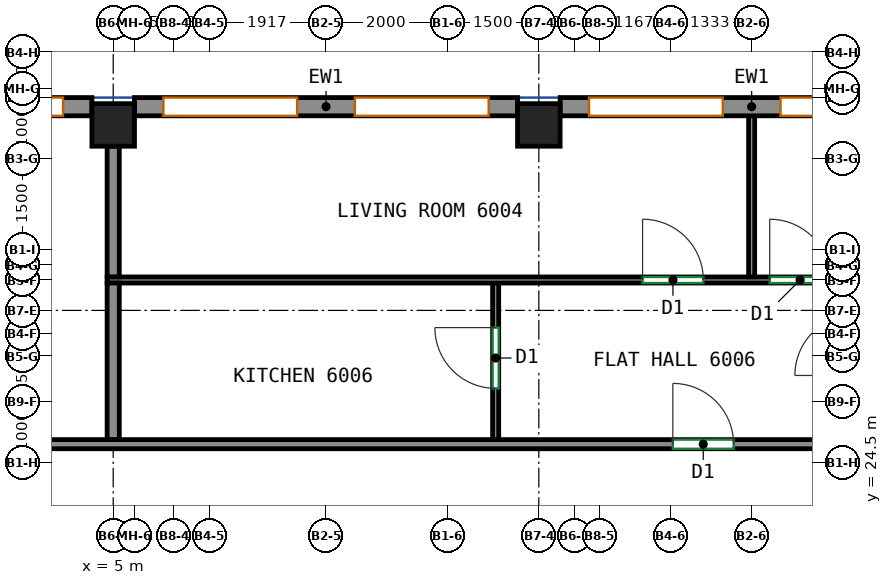
"""IFC4 building model, lengths in metres.
Left out: names, types, materials, properties, quantities, classifications, styles, units other than length and angle.
Written with IfcOpenShell. Run it as: python <this file> out.ifc"""

import sys

from ifc_helpers import new_model, si_unit, direction, frame, frame_2d, origin, origin_2d, place, context, subcontext, project, spatial, rectangle, extrude, source, transform, mapped, element, fill, save


model = new_model("IFC4")
c1 = context("Model", 3, precision=1e-05, world=origin(), true_north=direction((0.0, 1.0)))
c2 = subcontext(c1, "Body", "Model", "MODEL_VIEW")
j1 = project(units=[si_unit("LENGTHUNIT", "METRE"), si_unit("PLANEANGLEUNIT", "RADIAN")], contexts=[c1])
p1 = place(None, origin())
s1 = spatial("IfcSite", under=j1, at=p1, CompositionType="ELEMENT")
p2 = place(p1, origin())
s2 = spatial("IfcBuilding", under=s1, at=p2, CompositionType="ELEMENT")
p3 = place(p2, frame((0.0, 0.0, 249.2)))
s3 = spatial("IfcBuildingStorey", under=s2, at=p3, CompositionType="ELEMENT", Elevation=249.2)
m1 = source(origin(), c2, "Body", "SweptSolid", [
    extrude(rectangle(XDim=0.7, YDim=0.7, at=origin_2d()), origin(), (0.0, 0.0, 1.0), 3.12),
])
for number, where, z_axis, x_axis in (
    (1, (5.0, 30.05, 0.0), (0.0, 0.0, 1.0), (1.0, 0.0, 0.0)),
    (2, (12.0, 30.05, 0.0), (0.0, 0.0, 1.0), (1.0, 0.0, 0.0)),
):
    element("IfcColumn", number, at=place(p3, frame(where, z_axis=z_axis, x_axis=x_axis)), inside=s3, PredefinedType="COLUMN", context=c2, shape_type="MappedRepresentation", body=[
        mapped(m1, transform((0.0, 0.0, 0.0))),
    ])
m2 = source(origin(), c2, "Body", "SweptSolid", [
    extrude(rectangle(XDim=6.3, YDim=0.3, at=frame_2d((3.15, 0.0))), origin(), (0.0, 0.0, 1.0), 3.12),
])
p4 = place(p3, frame((18.65, 30.35, 0.0), z_axis=(0.0, 0.0, 1.0), x_axis=(-1.0, 0.0, 0.0)))
e3 = element("IfcWall", 3, at=p4, inside=s3, PredefinedType="SOLIDWALL", context=c2, shape_type="MappedRepresentation", body=[
    mapped(m2, transform((0.0, 0.0, 0.0))),
])
p5 = place(p4, frame((0.475, 0.0, 0.8)))
e4 = element("IfcOpeningElement", 4, at=p5, cuts=e3, PredefinedType="OPENING", context=c2, shape_type="SweptSolid", body=[
    extrude(rectangle(XDim=2.2, YDim=2.05, at=frame_2d((1.1, 1.025))), frame((0.0, 0.16, 0.0), z_axis=(0.0, -1.0, 0.0), x_axis=(1.0, 0.0, 0.0)), (0.0, 0.0, 1.0), 0.32),
])
p6 = place(p4, frame((3.625, 0.0, 0.8)))
e5 = element("IfcOpeningElement", 5, at=p6, cuts=e3, PredefinedType="OPENING", context=c2, shape_type="SweptSolid", body=[
    extrude(rectangle(XDim=2.2, YDim=2.05, at=frame_2d((1.1, 1.025))), frame((0.0, 0.16, 0.0), z_axis=(0.0, -1.0, 0.0), x_axis=(1.0, 0.0, 0.0)), (0.0, 0.0, 1.0), 0.32),
])
p7 = place(p3, frame((11.65, 30.35, 0.0), z_axis=(0.0, 0.0, 1.0), x_axis=(-1.0, 0.0, 0.0)))
e6 = element("IfcWall", 6, at=p7, inside=s3, PredefinedType="SOLIDWALL", context=c2, shape_type="MappedRepresentation", body=[
    mapped(m2, transform((0.0, 0.0, 0.0))),
])
p8 = place(p7, frame((0.475, 0.0, 0.8)))
e7 = element("IfcOpeningElement", 7, at=p8, cuts=e6, PredefinedType="OPENING", context=c2, shape_type="SweptSolid", body=[
    extrude(rectangle(XDim=2.2, YDim=2.05, at=frame_2d((1.1, 1.025))), frame((0.0, 0.16, 0.0), z_axis=(0.0, -1.0, 0.0), x_axis=(1.0, 0.0, 0.0)), (0.0, 0.0, 1.0), 0.32),
])
p9 = place(p7, frame((3.625, 0.0, 0.8)))
e8 = element("IfcOpeningElement", 8, at=p9, cuts=e6, PredefinedType="OPENING", context=c2, shape_type="SweptSolid", body=[
    extrude(rectangle(XDim=2.2, YDim=2.05, at=frame_2d((1.1, 1.025))), frame((0.0, 0.16, 0.0), z_axis=(0.0, -1.0, 0.0), x_axis=(1.0, 0.0, 0.0)), (0.0, 0.0, 1.0), 0.32),
])
p10 = place(p3, frame((4.65, 30.35, 0.0), z_axis=(0.0, 0.0, 1.0), x_axis=(-1.0, 0.0, 0.0)))
e9 = element("IfcWall", 9, at=p10, inside=s3, PredefinedType="SOLIDWALL", context=c2, shape_type="MappedRepresentation", body=[
    mapped(m2, transform((0.0, 0.0, 0.0))),
])
p11 = place(p10, frame((0.475, 0.0, 0.8)))
e10 = element("IfcOpeningElement", 10, at=p11, cuts=e9, PredefinedType="OPENING", context=c2, shape_type="SweptSolid", body=[
    extrude(rectangle(XDim=2.2, YDim=2.05, at=frame_2d((1.1, 1.025))), frame((0.0, 0.16, 0.0), z_axis=(0.0, -1.0, 0.0), x_axis=(1.0, 0.0, 0.0)), (0.0, 0.0, 1.0), 0.32),
])
p12 = place(p10, frame((3.625, 0.0, 0.8)))
e11 = element("IfcOpeningElement", 11, at=p12, cuts=e9, PredefinedType="OPENING", context=c2, shape_type="SweptSolid", body=[
    extrude(rectangle(XDim=2.2, YDim=2.05, at=frame_2d((1.1, 1.025))), frame((0.0, 0.16, 0.0), z_axis=(0.0, -1.0, 0.0), x_axis=(1.0, 0.0, 0.0)), (0.0, 0.0, 1.0), 0.32),
])
p13 = place(p3, frame((-16.075, 24.8, 0.0), z_axis=(0.0, 0.0, 1.0), x_axis=(1.0, 0.0, 0.0)))
e12 = element("IfcWall", 12, at=p13, inside=s3, PredefinedType="PARTITIONING", context=c2, shape_type="SweptSolid", body=[
    extrude(rectangle(XDim=36.073, YDim=0.15, at=frame_2d((18.037, 0.0))), origin(), (0.0, 0.0, 1.0), 3.12),
])
p14 = place(p13, frame((16.771, 0.0, 0.0)))
e13 = element("IfcOpeningElement", 13, at=p14, cuts=e12, PredefinedType="OPENING", context=c2, shape_type="SweptSolid", body=[
    extrude(rectangle(XDim=0.9, YDim=2.1, at=frame_2d((0.45, 1.05))), frame((0.0, 0.085, 0.0), z_axis=(0.0, -1.0, 0.0), x_axis=(1.0, 0.0, 0.0)), (0.0, 0.0, 1.0), 0.17),
])
p15 = place(p13, frame((30.279, 0.0, 0.0)))
e14 = element("IfcOpeningElement", 14, at=p15, cuts=e12, PredefinedType="OPENING", context=c2, shape_type="SweptSolid", body=[
    extrude(rectangle(XDim=1.0, YDim=2.1, at=frame_2d((0.5, 1.05))), frame((0.0, 0.085, 0.0), z_axis=(0.0, -1.0, 0.0), x_axis=(1.0, 0.0, 0.0)), (0.0, 0.0, 1.0), 0.17),
])
p16 = place(p3, frame((11.29, 24.877, 0.0), z_axis=(0.0, 0.0, 1.0), x_axis=(0.0, 1.0, 0.0)))
e15 = element("IfcWall", 15, at=p16, inside=s3, PredefinedType="PARTITIONING", context=c2, shape_type="SweptSolid", body=[
    extrude(rectangle(XDim=2.573, YDim=0.1, at=frame_2d((1.287, 0.0))), origin(), (0.0, 0.0, 1.0), 3.12),
])
p17 = place(p16, frame((0.84, 0.0, 0.0)))
e16 = element("IfcOpeningElement", 16, at=p17, cuts=e15, PredefinedType="OPENING", context=c2, shape_type="SweptSolid", body=[
    extrude(rectangle(XDim=1.0, YDim=2.1, at=frame_2d((0.5, 1.05))), frame((0.0, 0.06, 0.0), z_axis=(0.0, -1.0, 0.0), x_axis=(1.0, 0.0, 0.0)), (0.0, 0.0, 1.0), 0.12),
])
p18 = place(p3, frame((4.9, 27.5, 0.0), z_axis=(0.0, 0.0, 1.0), x_axis=(1.0, 0.0, 0.0)))
e17 = element("IfcWall", 17, at=p18, inside=s3, PredefinedType="PARTITIONING", context=c2, shape_type="SweptSolid", body=[
    extrude(rectangle(XDim=17.798, YDim=0.1, at=frame_2d((8.899, 0.0))), origin(), (0.0, 0.0, 1.0), 3.12),
])
p19 = place(p18, frame((8.806, 0.0, 0.0)))
e18 = element("IfcOpeningElement", 18, at=p19, cuts=e17, PredefinedType="OPENING", context=c2, shape_type="SweptSolid", body=[
    extrude(rectangle(XDim=1.0, YDim=2.1, at=frame_2d((0.5, 1.05))), frame((0.0, 0.06, 0.0), z_axis=(0.0, -1.0, 0.0), x_axis=(1.0, 0.0, 0.0)), (0.0, 0.0, 1.0), 0.12),
])
p20 = place(p18, frame((10.897, 0.0, 0.0)))
e19 = element("IfcOpeningElement", 19, at=p20, cuts=e17, PredefinedType="OPENING", context=c2, shape_type="SweptSolid", body=[
    extrude(rectangle(XDim=1.0, YDim=2.1, at=frame_2d((0.5, 1.05))), frame((0.0, 0.06, 0.0), z_axis=(0.0, -1.0, 0.0), x_axis=(1.0, 0.0, 0.0)), (0.0, 0.0, 1.0), 0.12),
])
p21 = place(p3, frame((5.0, 24.877, 0.0), z_axis=(0.0, 0.0, 1.0), x_axis=(0.0, 1.0, 0.0)))
e20 = element("IfcWall", 20, at=p21, inside=s3, PredefinedType="PARTITIONING", context=c2, shape_type="SweptSolid", body=[
    extrude(rectangle(XDim=2.573, YDim=0.2, at=frame_2d((1.287, 0.0))), origin(), (0.0, 0.0, 1.0), 3.12),
])
p22 = place(p3, frame((15.5, 27.552, 0.0), z_axis=(0.0, 0.0, 1.0), x_axis=(0.0, 1.0, 0.0)))
e21 = element("IfcWall", 21, at=p22, inside=s3, PredefinedType="PARTITIONING", context=c2, shape_type="SweptSolid", body=[
    extrude(rectangle(XDim=2.698, YDim=0.1, at=frame_2d((1.349, 0.0))), origin(), (0.0, 0.0, 1.0), 3.12),
])
p23 = place(p3, frame((5.0, 27.552, 0.0), z_axis=(0.0, 0.0, 1.0), x_axis=(0.0, 1.0, 0.0)))
e22 = element("IfcWall", 22, at=p23, inside=s3, PredefinedType="PARTITIONING", context=c2, shape_type="SweptSolid", body=[
    extrude(rectangle(XDim=2.148, YDim=0.2, at=frame_2d((1.074, 0.0))), origin(), (0.0, 0.0, 1.0), 3.12),
])
p24 = place(p5, origin())
e23 = element("IfcWindow", 23, at=p24, inside=s3, PartitioningType="SINGLE_PANEL", PredefinedType="WINDOW", context=c2, shape_type="SweptSolid", body=[
    extrude(rectangle(XDim=2.2, YDim=2.05, at=frame_2d((1.1, 1.025))), frame((0.0, 0.03, 0.0), z_axis=(0.0, -1.0, 0.0), x_axis=(1.0, 0.0, 0.0)), (0.0, 0.0, 1.0), 0.06),
])
fill(e4, e23)
p25 = place(p6, origin())
e24 = element("IfcWindow", 24, at=p25, inside=s3, PartitioningType="SINGLE_PANEL", PredefinedType="WINDOW", context=c2, shape_type="SweptSolid", body=[
    extrude(rectangle(XDim=2.2, YDim=2.05, at=frame_2d((1.1, 1.025))), frame((0.0, 0.03, 0.0), z_axis=(0.0, -1.0, 0.0), x_axis=(1.0, 0.0, 0.0)), (0.0, 0.0, 1.0), 0.06),
])
fill(e5, e24)
p26 = place(p8, origin())
e25 = element("IfcWindow", 25, at=p26, inside=s3, PartitioningType="SINGLE_PANEL", PredefinedType="WINDOW", context=c2, shape_type="SweptSolid", body=[
    extrude(rectangle(XDim=2.2, YDim=2.05, at=frame_2d((1.1, 1.025))), frame((0.0, 0.03, 0.0), z_axis=(0.0, -1.0, 0.0), x_axis=(1.0, 0.0, 0.0)), (0.0, 0.0, 1.0), 0.06),
])
fill(e7, e25)
p27 = place(p9, origin())
e26 = element("IfcWindow", 26, at=p27, inside=s3, PartitioningType="SINGLE_PANEL", PredefinedType="WINDOW", context=c2, shape_type="SweptSolid", body=[
    extrude(rectangle(XDim=2.2, YDim=2.05, at=frame_2d((1.1, 1.025))), frame((0.0, 0.03, 0.0), z_axis=(0.0, -1.0, 0.0), x_axis=(1.0, 0.0, 0.0)), (0.0, 0.0, 1.0), 0.06),
])
fill(e8, e26)
p28 = place(p11, origin())
e27 = element("IfcWindow", 27, at=p28, inside=s3, PartitioningType="SINGLE_PANEL", PredefinedType="WINDOW", context=c2, shape_type="SweptSolid", body=[
    extrude(rectangle(XDim=2.2, YDim=2.05, at=frame_2d((1.1, 1.025))), frame((0.0, 0.03, 0.0), z_axis=(0.0, -1.0, 0.0), x_axis=(1.0, 0.0, 0.0)), (0.0, 0.0, 1.0), 0.06),
])
fill(e10, e27)
p29 = place(p15, origin())
e28 = element("IfcDoor", 28, at=p29, inside=s3, OperationType="SINGLE_SWING_LEFT", PredefinedType="DOOR", context=c2, shape_type="SweptSolid", body=[
    extrude(rectangle(XDim=1.0, YDim=2.1, at=frame_2d((0.5, 1.05))), frame((0.0, 0.025, 0.0), z_axis=(0.0, -1.0, 0.0), x_axis=(1.0, 0.0, 0.0)), (0.0, 0.0, 1.0), 0.05),
])
fill(e14, e28)
p30 = place(p17, origin())
e29 = element("IfcDoor", 29, at=p30, inside=s3, OperationType="SINGLE_SWING_RIGHT", PredefinedType="DOOR", context=c2, shape_type="SweptSolid", body=[
    extrude(rectangle(XDim=1.0, YDim=2.1, at=frame_2d((0.5, 1.05))), frame((0.0, 0.025, 0.0), z_axis=(0.0, -1.0, 0.0), x_axis=(1.0, 0.0, 0.0)), (0.0, 0.0, 1.0), 0.05),
])
fill(e16, e29)
p31 = place(p19, origin())
e30 = element("IfcDoor", 30, at=p31, inside=s3, OperationType="SINGLE_SWING_LEFT", PredefinedType="DOOR", context=c2, shape_type="SweptSolid", body=[
    extrude(rectangle(XDim=1.0, YDim=2.1, at=frame_2d((0.5, 1.05))), frame((0.0, 0.025, 0.0), z_axis=(0.0, -1.0, 0.0), x_axis=(1.0, 0.0, 0.0)), (0.0, 0.0, 1.0), 0.05),
])
fill(e18, e30)
p32 = place(p20, origin())
e31 = element("IfcDoor", 31, at=p32, inside=s3, OperationType="SINGLE_SWING_LEFT", PredefinedType="DOOR", context=c2, shape_type="SweptSolid", body=[
    extrude(rectangle(XDim=1.0, YDim=2.1, at=frame_2d((0.5, 1.05))), frame((0.0, 0.025, 0.0), z_axis=(0.0, -1.0, 0.0), x_axis=(1.0, 0.0, 0.0)), (0.0, 0.0, 1.0), 0.05),
])
fill(e19, e31)
save(model, sys.argv[1])
